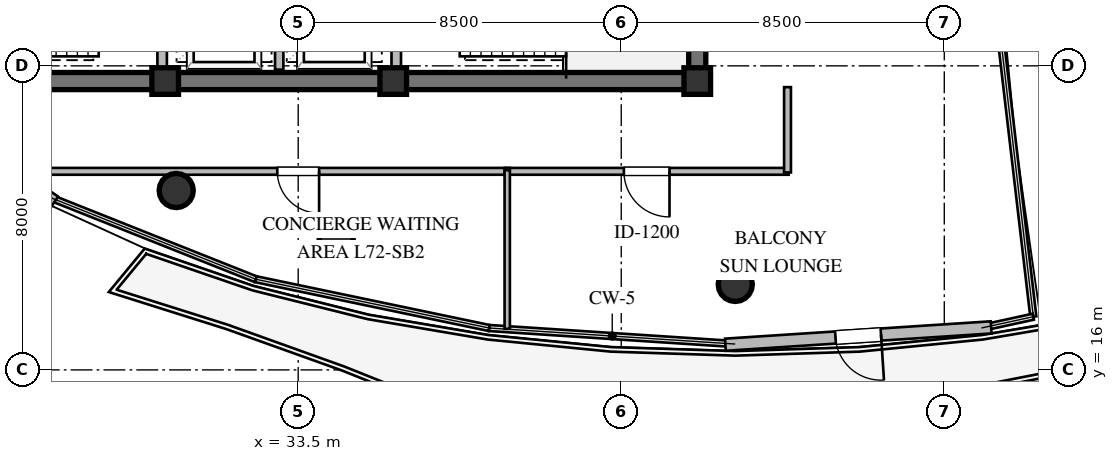
"""IFC4 building model, lengths in metres.
Left out: names, types, materials, properties, quantities, classifications, styles, units other than length and angle.
Written with IfcOpenShell. Run it as: python <this file> out.ifc"""

import sys

from ifc_helpers import new_model, si_unit, direction, frame, frame_2d, origin, origin_2d, place, context, subcontext, project, spatial, rectangle, circle, extrude, element, fill, save


model = new_model("IFC4")
c1 = context("Model", 3, precision=1e-05, world=origin(), true_north=direction((0.0, 1.0)))
c2 = subcontext(c1, "Body", "Model", "MODEL_VIEW")
j1 = project(units=[si_unit("LENGTHUNIT", "METRE"), si_unit("PLANEANGLEUNIT", "RADIAN")], contexts=[c1])
p1 = place(None, origin())
s1 = spatial("IfcSite", under=j1, at=p1, CompositionType="ELEMENT")
p2 = place(p1, origin())
s2 = spatial("IfcBuilding", under=s1, at=p2, CompositionType="ELEMENT")
p3 = place(p2, frame((0.0, 0.0, 273.8)))
s3 = spatial("IfcBuildingStorey", under=s2, at=p3, CompositionType="ELEMENT", Elevation=273.8)
p4 = place(p3, frame((21.775, 23.6, 0.0), z_axis=(0.0, 0.0, 1.0), x_axis=(1.0, 0.0, 0.0)))
e1 = element("IfcWall", 1, at=p4, inside=s3, PredefinedType="SHEAR", context=c2, shape_type="SweptSolid", body=[
    extrude(rectangle(XDim=22.45, YDim=0.45, at=frame_2d((11.225, 0.0))), origin(), (0.0, 0.0, 1.0), 3.56),
])
p5 = place(p3, frame((44.0, 23.825, 0.0), z_axis=(0.0, 0.0, 1.0), x_axis=(0.0, 1.0, 0.0)))
e2 = element("IfcWall", 2, at=p5, inside=s3, PredefinedType="SHEAR", context=c2, shape_type="SweptSolid", body=[
    extrude(rectangle(XDim=12.35, YDim=0.45, at=frame_2d((6.175, 0.0))), origin(), (0.0, 0.0, 1.0), 3.56),
])
p6 = place(p5, frame((8.675, 0.0, 0.0)))
e3 = element("IfcOpeningElement", 3, at=p6, cuts=e2, PredefinedType="OPENING", context=c2, shape_type="SweptSolid", body=[
    extrude(rectangle(XDim=1.5, YDim=2.15, at=frame_2d((0.75, 1.075))), frame((0.0, 0.235, 0.0), z_axis=(0.0, -1.0, 0.0), x_axis=(1.0, 0.0, 0.0)), (0.0, 0.0, 1.0), 0.47),
])
for number, where, z_axis, x_axis in (
    (4, (30.0, 23.6, 0.0), (0.0, 0.0, 1.0), (1.0, 0.0, 0.0)),
    (5, (36.0, 23.6, 0.0), (0.0, 0.0, 1.0), (1.0, 0.0, 0.0)),
    (6, (44.0, 23.6, 0.0), (0.0, 0.0, 1.0), (1.0, 0.0, 0.0)),
):
    element("IfcColumn", number, at=place(p3, frame(where, z_axis=z_axis, x_axis=x_axis)), inside=s3, PredefinedType="COLUMN", context=c2, shape_type="SweptSolid", body=[
        extrude(rectangle(XDim=0.7, YDim=0.7, at=origin_2d()), origin(), (0.0, 0.0, 1.0), 3.8),
    ])
for number, where, z_axis, x_axis in (
    (7, (30.29, 20.72, 0.0), (0.0, 0.0, 1.0), (1.0, 0.0, 0.0)),
    (8, (34.5, 19.42, 0.0), (0.0, 0.0, 1.0), (1.0, 0.0, 0.0)),
    (9, (45.0, 18.25, 0.0), (0.0, 0.0, 1.0), (1.0, 0.0, 0.0)),
):
    element("IfcColumn", number, at=place(p3, frame(where, z_axis=z_axis, x_axis=x_axis)), inside=s3, PredefinedType="COLUMN", context=c2, shape_type="SweptSolid", body=[
        extrude(circle(Radius=0.45, at=origin_2d()), origin(), (0.0, 0.0, 1.0), 3.8),
    ])
p7 = place(p3, frame((51.733, 17.119, 0.0), z_axis=(0.0, 0.0, 1.0), x_axis=(-0.997881827293, -0.065052738278, 0.0)))
e10 = element("IfcWall", 10, at=p7, inside=s3, PredefinedType="STANDARD", context=c2, shape_type="SweptSolid", body=[
    extrude(rectangle(XDim=7.007, YDim=0.32, at=frame_2d((3.503, 0.0))), origin(), (0.0, 0.0, 1.0), 3.56),
])
p8 = place(p7, frame((2.904, 0.0, 0.0)))
e11 = element("IfcOpeningElement", 11, at=p8, cuts=e10, PredefinedType="OPENING", context=c2, shape_type="SweptSolid", body=[
    extrude(rectangle(XDim=1.2, YDim=2.15, at=frame_2d((0.6, 1.075))), frame((0.0, 0.17, 0.0), z_axis=(0.0, -1.0, 0.0), x_axis=(1.0, 0.0, 0.0)), (0.0, 0.0, 1.0), 0.34),
])
p9 = place(p3, frame((27.093, 20.428, 0.0), z_axis=(0.0, 0.0, 1.0), x_axis=(-0.826047009588, 0.563601222454, 0.0)))
e12 = element("IfcWall", 12, at=p9, inside=s3, PredefinedType="STANDARD", context=c2, shape_type="SweptSolid", body=[
    extrude(rectangle(XDim=6.074, YDim=0.32, at=frame_2d((3.037, 0.0))), origin(), (0.0, 0.0, 1.0), 2.35),
])
p10 = place(p3, frame((29.92, 23.9, 0.0), z_axis=(0.0, 0.0, 1.0), x_axis=(0.0, 1.0, 0.0)))
e13 = element("IfcWall", 13, at=p10, inside=s3, PredefinedType="SOLIDWALL", context=c2, shape_type="SweptSolid", body=[
    extrude(rectangle(XDim=5.4, YDim=0.25, at=frame_2d((2.7, 0.0))), origin(), (0.0, 0.0, 1.0), 3.006),
])
p11 = place(p10, frame((3.421, 0.0, 0.0)))
e14 = element("IfcOpeningElement", 14, at=p11, cuts=e13, PredefinedType="OPENING", context=c2, shape_type="SweptSolid", body=[
    extrude(rectangle(XDim=1.15, YDim=2.1, at=frame_2d((0.575, 1.05))), frame((0.0, 0.135, 0.0), z_axis=(0.0, -1.0, 0.0), x_axis=(1.0, 0.0, 0.0)), (0.0, 0.0, 1.0), 0.27),
])
p12 = place(p3, frame((36.08, 23.9, 0.0), z_axis=(0.0, 0.0, 1.0), x_axis=(0.0, 1.0, 0.0)))
e15 = element("IfcWall", 15, at=p12, inside=s3, PredefinedType="SOLIDWALL", context=c2, shape_type="SweptSolid", body=[
    extrude(rectangle(XDim=5.4, YDim=0.25, at=frame_2d((2.7, 0.0))), origin(), (0.0, 0.0, 1.0), 3.56),
])
p13 = place(p12, frame((3.421, 0.0, 0.0)))
e16 = element("IfcOpeningElement", 16, at=p13, cuts=e15, PredefinedType="OPENING", context=c2, shape_type="SweptSolid", body=[
    extrude(rectangle(XDim=1.15, YDim=2.1, at=frame_2d((0.575, 1.05))), frame((0.0, 0.135, 0.0), z_axis=(0.0, -1.0, 0.0), x_axis=(1.0, 0.0, 0.0)), (0.0, 0.0, 1.0), 0.27),
])
p14 = place(p3, frame((33.0, 23.9, 0.0), z_axis=(0.0, 0.0, 1.0), x_axis=(0.0, 1.0, 0.0)))
e17 = element("IfcWall", 17, at=p14, inside=s3, PredefinedType="SOLIDWALL", context=c2, shape_type="SweptSolid", body=[
    extrude(rectangle(XDim=2.72, YDim=0.22, at=frame_2d((1.36, 0.0))), origin(), (0.0, 0.0, 1.0), 3.56),
])
p15 = place(p3, frame((39.065, 21.225, 0.0), z_axis=(0.0, 0.0, 1.0), x_axis=(-1.0, 0.0, 0.0)))
e18 = element("IfcWall", 18, at=p15, inside=s3, PredefinedType="PARTITIONING", context=c2, shape_type="SweptSolid", body=[
    extrude(rectangle(XDim=13.13, YDim=0.18, at=frame_2d((6.565, 0.0))), origin(), (0.0, 0.0, 1.0), 3.017),
])
p16 = place(p15, frame((5.015, 0.0, 0.0)))
e19 = element("IfcOpeningElement", 19, at=p16, cuts=e18, PredefinedType="OPENING", context=c2, shape_type="SweptSolid", body=[
    extrude(rectangle(XDim=1.1, YDim=2.1, at=frame_2d((0.55, 1.05))), frame((0.0, 0.1, 0.0), z_axis=(0.0, -1.0, 0.0), x_axis=(1.0, 0.0, 0.0)), (0.0, 0.0, 1.0), 0.2),
])
p17 = place(p3, frame((46.405, 21.225, 0.0), z_axis=(0.0, 0.0, 1.0), x_axis=(-1.0, 0.0, 0.0)))
e20 = element("IfcWall", 20, at=p17, inside=s3, PredefinedType="PARTITIONING", context=c2, shape_type="SweptSolid", body=[
    extrude(rectangle(XDim=7.47, YDim=0.18, at=frame_2d((3.735, 0.0))), origin(), (0.0, 0.0, 1.0), 3.196),
])
p18 = place(p17, frame((3.135, 0.0, 0.0)))
e21 = element("IfcOpeningElement", 21, at=p18, cuts=e20, PredefinedType="OPENING", context=c2, shape_type="SweptSolid", body=[
    extrude(rectangle(XDim=1.2, YDim=2.15, at=frame_2d((0.6, 1.075))), frame((0.0, 0.1, 0.0), z_axis=(0.0, -1.0, 0.0), x_axis=(1.0, 0.0, 0.0)), (0.0, 0.0, 1.0), 0.2),
])
p19 = place(p3, frame((46.375, 23.44, 0.0), z_axis=(0.0, 0.0, 1.0), x_axis=(0.0, -1.0, 0.0)))
e22 = element("IfcWall", 22, at=p19, inside=s3, PredefinedType="PARTITIONING", context=c2, shape_type="SweptSolid", body=[
    extrude(rectangle(XDim=2.245, YDim=0.18, at=frame_2d((1.123, 0.0))), origin(), (0.0, 0.0, 1.0), 3.56),
])
p20 = place(p3, frame((39.0, 21.255, 0.0), z_axis=(0.0, 0.0, 1.0), x_axis=(0.0, -1.0, 0.0)))
e23 = element("IfcWall", 23, at=p20, inside=s3, PredefinedType="PARTITIONING", context=c2, shape_type="SweptSolid", body=[
    extrude(rectangle(XDim=4.174, YDim=0.14, at=frame_2d((2.087, 0.0))), origin(), (0.0, 0.0, 1.0), 3.56),
])
p21 = place(p8, origin())
e24 = element("IfcDoor", 24, at=p21, inside=s3, OperationType="SINGLE_SWING_LEFT", PredefinedType="DOOR", context=c2, shape_type="SweptSolid", body=[
    extrude(rectangle(XDim=1.2, YDim=2.15, at=frame_2d((0.6, 1.075))), frame((0.0, 0.025, 0.0), z_axis=(0.0, -1.0, 0.0), x_axis=(1.0, 0.0, 0.0)), (0.0, 0.0, 1.0), 0.05),
])
fill(e11, e24)
p22 = place(p16, origin())
e25 = element("IfcDoor", 25, at=p22, inside=s3, OperationType="SINGLE_SWING_LEFT", PredefinedType="DOOR", context=c2, shape_type="SweptSolid", body=[
    extrude(rectangle(XDim=1.1, YDim=2.1, at=frame_2d((0.55, 1.05))), frame((0.0, 0.025, 0.0), z_axis=(0.0, -1.0, 0.0), x_axis=(1.0, 0.0, 0.0)), (0.0, 0.0, 1.0), 0.05),
])
fill(e19, e25)
p23 = place(p18, origin())
e26 = element("IfcDoor", 26, at=p23, inside=s3, OperationType="SINGLE_SWING_LEFT", PredefinedType="DOOR", context=c2, shape_type="SweptSolid", body=[
    extrude(rectangle(XDim=1.2, YDim=2.15, at=frame_2d((0.6, 1.075))), frame((0.0, 0.025, 0.0), z_axis=(0.0, -1.0, 0.0), x_axis=(1.0, 0.0, 0.0)), (0.0, 0.0, 1.0), 0.05),
])
fill(e21, e26)
save(model, sys.argv[1])
